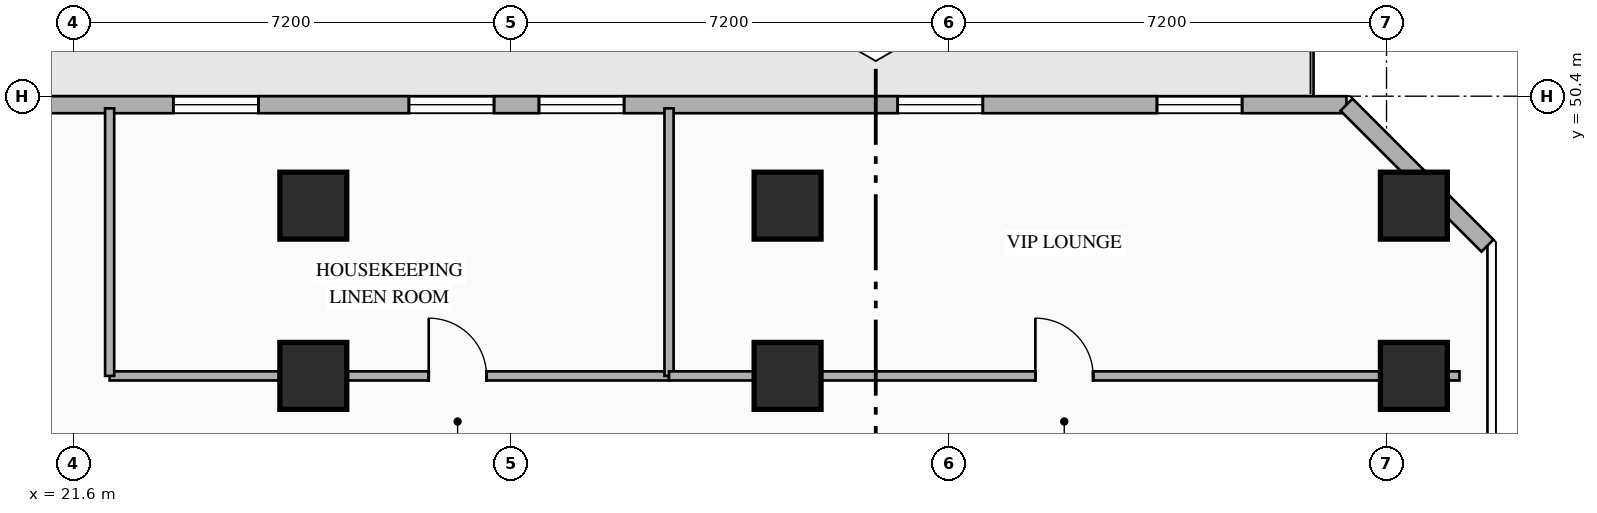
"""IFC4 building model, lengths in metres.
Left out: names, types, materials, properties, quantities, classifications, styles, units other than length and angle.
Written with IfcOpenShell. Run it as: python <this file> out.ifc"""

import sys

from ifc_helpers import new_model, si_unit, direction, frame, frame_2d, origin, origin_2d, place, context, subcontext, project, spatial, rectangle, hollow_rectangle, extrude, element, fill, save


model = new_model("IFC4")
c1 = context("Model", 3, precision=1e-05, world=origin(), true_north=direction((0.0, 1.0)))
c2 = subcontext(c1, "Body", "Model", "MODEL_VIEW")
j1 = project(units=[si_unit("LENGTHUNIT", "METRE"), si_unit("PLANEANGLEUNIT", "RADIAN")], contexts=[c1])
p1 = place(None, origin())
s1 = spatial("IfcSite", under=j1, at=p1, CompositionType="ELEMENT")
p2 = place(p1, origin())
s2 = spatial("IfcBuilding", under=s1, at=p2, CompositionType="ELEMENT")
p3 = place(p2, frame((0.0, 0.0, 43.3)))
s3 = spatial("IfcBuildingStorey", under=s2, at=p3, CompositionType="ELEMENT", Elevation=43.3)
for number, where, z_axis, x_axis in (
    (1, (25.55, 45.8, 0.0), (0.0, 0.0, 1.0), (1.0, 0.0, 0.0)),
    (2, (33.35, 45.8, 0.0), (0.0, 0.0, 1.0), (1.0, 0.0, 0.0)),
    (3, (43.65, 45.8, 0.0), (0.0, 0.0, 1.0), (1.0, 0.0, 0.0)),
    (4, (25.55, 48.6, 0.0), (0.0, 0.0, 1.0), (1.0, 0.0, 0.0)),
    (5, (33.35, 48.6, 0.0), (0.0, 0.0, 1.0), (1.0, 0.0, 0.0)),
    (6, (43.65, 48.6, 0.0), (0.0, 0.0, 1.0), (1.0, 0.0, 0.0)),
):
    element("IfcColumn", number, at=place(p3, frame(where, z_axis=z_axis, x_axis=x_axis)), inside=s3, PredefinedType="COLUMN", context=c2, shape_type="SweptSolid", body=[
        extrude(hollow_rectangle(XDim=1.1, YDim=1.1, WallThickness=0.04, at=origin_2d()), origin(), (0.0, 0.0, 1.0), 3.35),
    ])
p4 = place(p3, frame((2.458, 50.26, 0.0), z_axis=(0.0, 0.0, 1.0), x_axis=(1.0, 0.0, 0.0)))
e7 = element("IfcWall", 7, at=p4, inside=s3, PredefinedType="STANDARD", context=c2, shape_type="SweptSolid", body=[
    extrude(rectangle(XDim=40.084, YDim=0.28, at=frame_2d((20.042, 0.0))), origin(), (0.0, 0.0, 1.0), 3.13),
])
p5 = place(p4, frame((4.26, 0.0, 0.0)))
e8 = element("IfcOpeningElement", 8, at=p5, cuts=e7, PredefinedType="OPENING", context=c2, shape_type="SweptSolid", body=[
    extrude(rectangle(XDim=1.1, YDim=2.2, at=frame_2d((0.55, 1.1))), frame((0.0, 0.15, 0.0), z_axis=(0.0, -1.0, 0.0), x_axis=(1.0, 0.0, 0.0)), (0.0, 0.0, 1.0), 0.3),
])
p6 = place(p4, frame((0.46, 0.0, 0.85)))
e9 = element("IfcOpeningElement", 9, at=p6, cuts=e7, PredefinedType="OPENING", context=c2, shape_type="SweptSolid", body=[
    extrude(rectangle(XDim=1.4, YDim=1.8, at=frame_2d((0.7, 0.9))), frame((0.0, 0.15, 0.0), z_axis=(0.0, -1.0, 0.0), x_axis=(1.0, 0.0, 0.0)), (0.0, 0.0, 1.0), 0.3),
])
p7 = place(p4, frame((10.0, 0.0, 0.85)))
e10 = element("IfcOpeningElement", 10, at=p7, cuts=e7, PredefinedType="OPENING", context=c2, shape_type="SweptSolid", body=[
    extrude(rectangle(XDim=1.4, YDim=1.8, at=frame_2d((0.7, 0.9))), frame((0.0, 0.15, 0.0), z_axis=(0.0, -1.0, 0.0), x_axis=(1.0, 0.0, 0.0)), (0.0, 0.0, 1.0), 0.3),
])
p8 = place(p4, frame((14.02, 0.0, 0.85)))
e11 = element("IfcOpeningElement", 11, at=p8, cuts=e7, PredefinedType="OPENING", context=c2, shape_type="SweptSolid", body=[
    extrude(rectangle(XDim=1.4, YDim=1.8, at=frame_2d((0.7, 0.9))), frame((0.0, 0.15, 0.0), z_axis=(0.0, -1.0, 0.0), x_axis=(1.0, 0.0, 0.0)), (0.0, 0.0, 1.0), 0.3),
])
p9 = place(p4, frame((20.789, 0.0, 0.85)))
e12 = element("IfcOpeningElement", 12, at=p9, cuts=e7, PredefinedType="OPENING", context=c2, shape_type="SweptSolid", body=[
    extrude(rectangle(XDim=1.4, YDim=1.8, at=frame_2d((0.7, 0.9))), frame((0.0, 0.15, 0.0), z_axis=(0.0, -1.0, 0.0), x_axis=(1.0, 0.0, 0.0)), (0.0, 0.0, 1.0), 0.3),
])
p10 = place(p4, frame((24.664, 0.0, 0.85)))
e13 = element("IfcOpeningElement", 13, at=p10, cuts=e7, PredefinedType="OPENING", context=c2, shape_type="SweptSolid", body=[
    extrude(rectangle(XDim=1.4, YDim=1.8, at=frame_2d((0.7, 0.9))), frame((0.0, 0.15, 0.0), z_axis=(0.0, -1.0, 0.0), x_axis=(1.0, 0.0, 0.0)), (0.0, 0.0, 1.0), 0.3),
])
p11 = place(p4, frame((26.803, 0.0, 0.85)))
e14 = element("IfcOpeningElement", 14, at=p11, cuts=e7, PredefinedType="OPENING", context=c2, shape_type="SweptSolid", body=[
    extrude(rectangle(XDim=1.4, YDim=1.8, at=frame_2d((0.7, 0.9))), frame((0.0, 0.15, 0.0), z_axis=(0.0, -1.0, 0.0), x_axis=(1.0, 0.0, 0.0)), (0.0, 0.0, 1.0), 0.3),
])
p12 = place(p4, frame((32.703, 0.0, 0.85)))
e15 = element("IfcOpeningElement", 15, at=p12, cuts=e7, PredefinedType="OPENING", context=c2, shape_type="SweptSolid", body=[
    extrude(rectangle(XDim=1.4, YDim=1.8, at=frame_2d((0.7, 0.9))), frame((0.0, 0.15, 0.0), z_axis=(0.0, -1.0, 0.0), x_axis=(1.0, 0.0, 0.0)), (0.0, 0.0, 1.0), 0.3),
])
p13 = place(p4, frame((36.967, 0.0, 0.85)))
e16 = element("IfcOpeningElement", 16, at=p13, cuts=e7, PredefinedType="OPENING", context=c2, shape_type="SweptSolid", body=[
    extrude(rectangle(XDim=1.4, YDim=1.8, at=frame_2d((0.7, 0.9))), frame((0.0, 0.15, 0.0), z_axis=(0.0, -1.0, 0.0), x_axis=(1.0, 0.0, 0.0)), (0.0, 0.0, 1.0), 0.3),
])
p14 = place(p3, frame((42.542, 50.26, 0.0), z_axis=(0.0, 0.0, 1.0), x_axis=(0.707106781187, -0.707106781187, 0.0)))
e17 = element("IfcWall", 17, at=p14, inside=s3, PredefinedType="STANDARD", context=c2, shape_type="SweptSolid", body=[
    extrude(rectangle(XDim=3.278, YDim=0.28, at=frame_2d((1.639, 0.0))), origin(), (0.0, 0.0, 1.0), 3.13),
])
p15 = place(p3, frame((22.2, 45.8, 0.0), z_axis=(0.0, 0.0, 1.0), x_axis=(1.0, 0.0, 0.0)))
e18 = element("IfcWall", 18, at=p15, inside=s3, PredefinedType="PARTITIONING", context=c2, shape_type="SweptSolid", body=[
    extrude(rectangle(XDim=9.2, YDim=0.15, at=frame_2d((4.6, 0.0))), origin(), (0.0, 0.0, 1.0), 2.425),
])
p16 = place(p15, frame((5.248, 0.0, 0.0)))
e19 = element("IfcOpeningElement", 19, at=p16, cuts=e18, PredefinedType="OPENING", context=c2, shape_type="SweptSolid", body=[
    extrude(rectangle(XDim=0.95, YDim=2.15, at=frame_2d((0.475, 1.075))), frame((0.0, 0.085, 0.0), z_axis=(0.0, -1.0, 0.0), x_axis=(1.0, 0.0, 0.0)), (0.0, 0.0, 1.0), 0.17),
])
for number, where, z_axis, x_axis in (
    (20, (22.2, 45.8, 0.0), (0.0, 0.0, 1.0), (0.0, 1.0, 0.0)),
    (21, (31.4, 45.8, 0.0), (0.0, 0.0, 1.0), (0.0, 1.0, 0.0)),
):
    element("IfcWall", number, at=place(p3, frame(where, z_axis=z_axis, x_axis=x_axis)), inside=s3, PredefinedType="PARTITIONING", context=c2, shape_type="SweptSolid", body=[
        extrude(rectangle(XDim=4.4, YDim=0.15, at=frame_2d((2.2, 0.0))), origin(), (0.0, 0.0, 1.0), 3.13),
    ])
p17 = place(p3, frame((31.4, 45.8, 0.0), z_axis=(0.0, 0.0, 1.0), x_axis=(1.0, 0.0, 0.0)))
e22 = element("IfcWall", 22, at=p17, inside=s3, PredefinedType="PARTITIONING", context=c2, shape_type="SweptSolid", body=[
    extrude(rectangle(XDim=13.0, YDim=0.15, at=frame_2d((6.5, 0.0))), origin(), (0.0, 0.0, 1.0), 2.425),
])
p18 = place(p17, frame((6.025, 0.0, 0.0)))
e23 = element("IfcOpeningElement", 23, at=p18, cuts=e22, PredefinedType="OPENING", context=c2, shape_type="SweptSolid", body=[
    extrude(rectangle(XDim=0.95, YDim=2.15, at=frame_2d((0.475, 1.075))), frame((0.0, 0.085, 0.0), z_axis=(0.0, -1.0, 0.0), x_axis=(1.0, 0.0, 0.0)), (0.0, 0.0, 1.0), 0.17),
])
p19 = place(p9, origin())
e24 = element("IfcWindow", 24, at=p19, inside=s3, PartitioningType="SINGLE_PANEL", PredefinedType="WINDOW", context=c2, shape_type="SweptSolid", body=[
    extrude(rectangle(XDim=1.4, YDim=1.8, at=frame_2d((0.7, 0.9))), frame((0.0, 0.03, 0.0), z_axis=(0.0, -1.0, 0.0), x_axis=(1.0, 0.0, 0.0)), (0.0, 0.0, 1.0), 0.06),
])
fill(e12, e24)
p20 = place(p10, origin())
e25 = element("IfcWindow", 25, at=p20, inside=s3, PartitioningType="SINGLE_PANEL", PredefinedType="WINDOW", context=c2, shape_type="SweptSolid", body=[
    extrude(rectangle(XDim=1.4, YDim=1.8, at=frame_2d((0.7, 0.9))), frame((0.0, 0.03, 0.0), z_axis=(0.0, -1.0, 0.0), x_axis=(1.0, 0.0, 0.0)), (0.0, 0.0, 1.0), 0.06),
])
fill(e13, e25)
p21 = place(p11, origin())
e26 = element("IfcWindow", 26, at=p21, inside=s3, PartitioningType="SINGLE_PANEL", PredefinedType="WINDOW", context=c2, shape_type="SweptSolid", body=[
    extrude(rectangle(XDim=1.4, YDim=1.8, at=frame_2d((0.7, 0.9))), frame((0.0, 0.03, 0.0), z_axis=(0.0, -1.0, 0.0), x_axis=(1.0, 0.0, 0.0)), (0.0, 0.0, 1.0), 0.06),
])
fill(e14, e26)
p22 = place(p12, origin())
e27 = element("IfcWindow", 27, at=p22, inside=s3, PartitioningType="SINGLE_PANEL", PredefinedType="WINDOW", context=c2, shape_type="SweptSolid", body=[
    extrude(rectangle(XDim=1.4, YDim=1.8, at=frame_2d((0.7, 0.9))), frame((0.0, 0.03, 0.0), z_axis=(0.0, -1.0, 0.0), x_axis=(1.0, 0.0, 0.0)), (0.0, 0.0, 1.0), 0.06),
])
fill(e15, e27)
p23 = place(p13, origin())
e28 = element("IfcWindow", 28, at=p23, inside=s3, PartitioningType="SINGLE_PANEL", PredefinedType="WINDOW", context=c2, shape_type="SweptSolid", body=[
    extrude(rectangle(XDim=1.4, YDim=1.8, at=frame_2d((0.7, 0.9))), frame((0.0, 0.03, 0.0), z_axis=(0.0, -1.0, 0.0), x_axis=(1.0, 0.0, 0.0)), (0.0, 0.0, 1.0), 0.06),
])
fill(e16, e28)
p24 = place(p16, origin())
e29 = element("IfcDoor", 29, at=p24, inside=s3, OperationType="SINGLE_SWING_LEFT", PredefinedType="DOOR", context=c2, shape_type="SweptSolid", body=[
    extrude(rectangle(XDim=0.95, YDim=2.15, at=frame_2d((0.475, 1.075))), frame((0.0, 0.025, 0.0), z_axis=(0.0, -1.0, 0.0), x_axis=(1.0, 0.0, 0.0)), (0.0, 0.0, 1.0), 0.05),
])
fill(e19, e29)
p25 = place(p18, origin())
e30 = element("IfcDoor", 30, at=p25, inside=s3, OperationType="SINGLE_SWING_LEFT", PredefinedType="DOOR", context=c2, shape_type="SweptSolid", body=[
    extrude(rectangle(XDim=0.95, YDim=2.15, at=frame_2d((0.475, 1.075))), frame((0.0, 0.025, 0.0), z_axis=(0.0, -1.0, 0.0), x_axis=(1.0, 0.0, 0.0)), (0.0, 0.0, 1.0), 0.05),
])
fill(e23, e30)
save(model, sys.argv[1])
